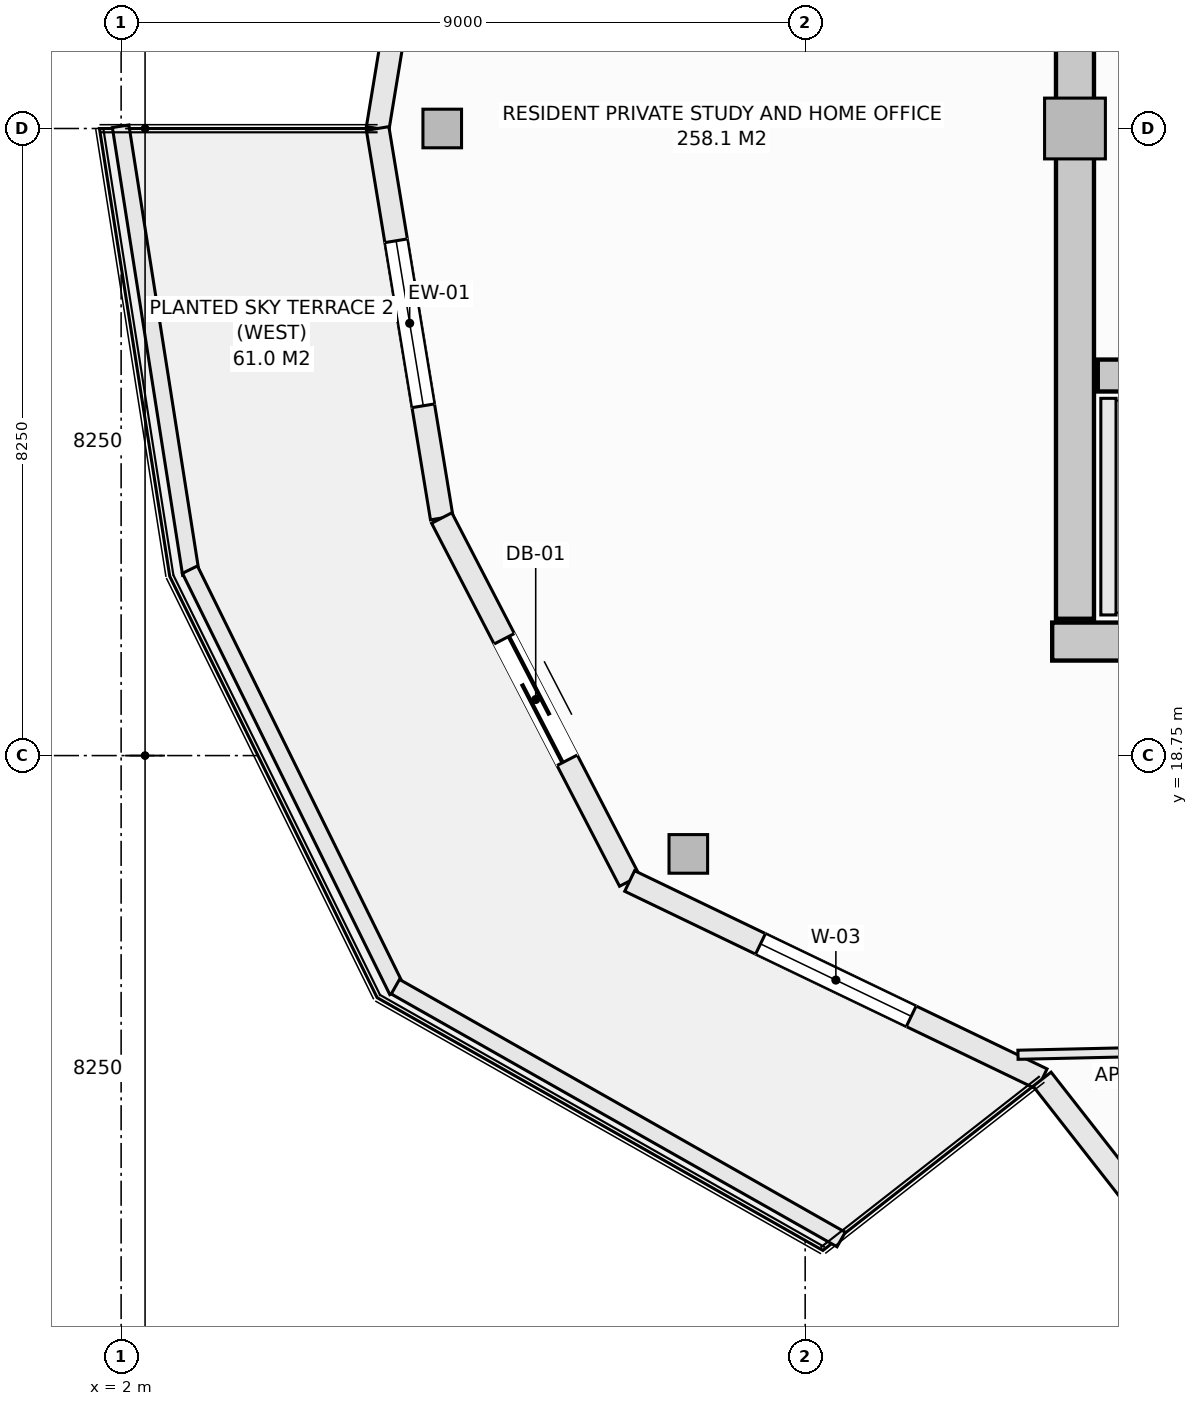
"""IFC4 building model, lengths in metres.
Left out: names, types, materials, properties, quantities, classifications, styles, units other than length and angle.
Written with IfcOpenShell. Run it as: python <this file> out.ifc"""

import sys

from ifc_helpers import new_model, si_unit, direction, frame, frame_2d, origin, origin_2d, place, context, subcontext, project, spatial, rectangle, hollow_rectangle, extrude, element, fill, save


model = new_model("IFC4")
c1 = context("Model", 3, precision=1e-05, world=origin(), true_north=direction((0.0, 1.0)))
c2 = subcontext(c1, "Body", "Model", "MODEL_VIEW")
j1 = project(units=[si_unit("LENGTHUNIT", "METRE"), si_unit("PLANEANGLEUNIT", "RADIAN")], contexts=[c1])
p1 = place(None, origin())
s1 = spatial("IfcSite", under=j1, at=p1, CompositionType="ELEMENT")
p2 = place(p1, origin())
s2 = spatial("IfcBuilding", under=s1, at=p2, CompositionType="ELEMENT")
p3 = place(p2, frame((0.0, 0.0, 229.4)))
s3 = spatial("IfcBuildingStorey", under=s2, at=p3, CompositionType="ELEMENT", Elevation=229.4)
p4 = place(p3, frame((14.25, 20.25, -0.27), z_axis=(0.0, 0.0, 1.0), x_axis=(1.0, 0.0, 0.0)))
e1 = element("IfcWall", 1, at=p4, inside=s3, PredefinedType="SHEAR", context=c2, shape_type="SweptSolid", body=[
    extrude(rectangle(XDim=13.5, YDim=0.5, at=frame_2d((6.75, 0.0))), origin(), (0.0, 0.0, 1.0), 3.3),
])
p5 = place(p3, frame((14.55, 20.55, -0.27), z_axis=(0.0, 0.0, 1.0), x_axis=(0.0, 1.0, 0.0)))
e2 = element("IfcWall", 2, at=p5, inside=s3, PredefinedType="SHEAR", context=c2, shape_type="SweptSolid", body=[
    extrude(rectangle(XDim=12.9, YDim=0.5, at=frame_2d((6.45, 0.0))), origin(), (0.0, 0.0, 1.0), 3.3),
])
p6 = place(p3, frame((14.85, 23.75, -0.27), z_axis=(0.0, 0.0, 1.0), x_axis=(1.0, 0.0, 0.0)))
e3 = element("IfcWall", 3, at=p6, inside=s3, PredefinedType="SHEAR", context=c2, shape_type="SweptSolid", body=[
    extrude(rectangle(XDim=7.3, YDim=0.42, at=frame_2d((3.65, 0.0))), origin(), (0.0, 0.0, 1.0), 3.3),
])
for number, where, z_axis, x_axis in (
    (4, (6.225, 27.0, -0.27), (0.0, 0.0, 1.0), (1.0, 0.0, 0.0)),
    (5, (9.463, 17.456, -0.27), (0.0, 0.0, 1.0), (1.0, 0.0, 0.0)),
):
    element("IfcColumn", number, at=place(p3, frame(where, z_axis=z_axis, x_axis=x_axis)), inside=s3, PredefinedType="COLUMN", context=c2, shape_type="SweptSolid", body=[
        extrude(hollow_rectangle(XDim=0.508, YDim=0.508, WallThickness=0.019, at=origin_2d()), origin(), (0.0, 0.0, 1.0), 3.3),
    ])
p7 = place(p3, frame((14.55, 27.0, -0.27), z_axis=(0.0, 0.0, 1.0), x_axis=(1.0, 0.0, 0.0)))
e6 = element("IfcColumn", 6, at=p7, inside=s3, PredefinedType="PILASTER", context=c2, shape_type="SweptSolid", body=[
    extrude(rectangle(XDim=0.8, YDim=0.8, at=origin_2d()), origin(), (0.0, 0.0, 1.0), 3.3),
])
p8 = place(p3, frame((5.375, 27.0, 0.0), z_axis=(0.0, 0.0, 1.0), x_axis=(0.16237087798, 0.986729799886, 0.0)))
e7 = element("IfcWall", 7, at=p8, inside=s3, PredefinedType="SOLIDWALL", context=c2, shape_type="SweptSolid", body=[
    extrude(rectangle(XDim=5.193, YDim=0.3, at=frame_2d((2.597, 0.0))), origin(), (0.0, 0.0, 1.0), 2.605),
])
p9 = place(p8, frame((1.497, 0.0, 0.72)))
e8 = element("IfcOpeningElement", 8, at=p9, cuts=e7, PredefinedType="OPENING", context=c2, shape_type="SweptSolid", body=[
    extrude(rectangle(XDim=2.2, YDim=1.65, at=frame_2d((1.1, 0.825))), frame((0.0, 0.16, 0.0), z_axis=(0.0, -1.0, 0.0), x_axis=(1.0, 0.0, 0.0)), (0.0, 0.0, 1.0), 0.32),
])
p10 = place(p3, frame((5.375, 27.0, 0.0), z_axis=(0.0, 0.0, 1.0), x_axis=(0.16237087798, -0.986729799886, 0.0)))
e9 = element("IfcWall", 9, at=p10, inside=s3, PredefinedType="SOLIDWALL", context=c2, shape_type="SweptSolid", body=[
    extrude(rectangle(XDim=5.193, YDim=0.3, at=frame_2d((2.597, 0.0))), origin(), (0.0, 0.0, 1.0), 2.605),
])
p11 = place(p10, frame((1.497, 0.0, 0.72)))
e10 = element("IfcOpeningElement", 10, at=p11, cuts=e9, PredefinedType="OPENING", context=c2, shape_type="SweptSolid", body=[
    extrude(rectangle(XDim=2.2, YDim=1.65, at=frame_2d((1.1, 0.825))), frame((0.0, 0.16, 0.0), z_axis=(0.0, -1.0, 0.0), x_axis=(1.0, 0.0, 0.0)), (0.0, 0.0, 1.0), 0.32),
])
p12 = place(p3, frame((6.218, 21.875, 0.0), z_axis=(0.0, 0.0, 1.0), x_axis=(0.459808219482, -0.888018243786, 0.0)))
e11 = element("IfcWall", 11, at=p12, inside=s3, PredefinedType="SOLIDWALL", context=c2, shape_type="SweptSolid", body=[
    extrude(rectangle(XDim=5.378, YDim=0.3, at=frame_2d((2.689, 0.0))), origin(), (0.0, 0.0, 1.0), 2.605),
])
p13 = place(p12, frame((1.789, 0.0, 0.0)))
e12 = element("IfcOpeningElement", 12, at=p13, cuts=e11, PredefinedType="OPENING", context=c2, shape_type="SweptSolid", body=[
    extrude(rectangle(XDim=1.8, YDim=2.25, at=frame_2d((0.9, 1.125))), frame((0.0, 0.16, 0.0), z_axis=(0.0, -1.0, 0.0), x_axis=(1.0, 0.0, 0.0)), (0.0, 0.0, 1.0), 0.32),
])
p14 = place(p3, frame((8.691, 17.1, 0.0), z_axis=(0.0, 0.0, 1.0), x_axis=(0.901348331142, -0.433094892545, 0.0)))
e13 = element("IfcWall", 13, at=p14, inside=s3, PredefinedType="SOLIDWALL", context=c2, shape_type="SweptSolid", body=[
    extrude(rectangle(XDim=6.021, YDim=0.3, at=frame_2d((3.01, 0.0))), origin(), (0.0, 0.0, 1.0), 2.605),
])
p15 = place(p14, frame((1.91, 0.0, 0.72)))
e14 = element("IfcOpeningElement", 14, at=p15, cuts=e13, PredefinedType="OPENING", context=c2, shape_type="SweptSolid", body=[
    extrude(rectangle(XDim=2.2, YDim=1.65, at=frame_2d((1.1, 0.825))), frame((0.0, 0.16, 0.0), z_axis=(0.0, -1.0, 0.0), x_axis=(1.0, 0.0, 0.0)), (0.0, 0.0, 1.0), 0.32),
])
p16 = place(p3, frame((14.117, 14.493, 0.0), z_axis=(0.0, 0.0, 1.0), x_axis=(0.616450126935, -0.787393955401, 0.0)))
e15 = element("IfcWall", 15, at=p16, inside=s3, PredefinedType="SOLIDWALL", context=c2, shape_type="SweptSolid", body=[
    extrude(rectangle(XDim=5.893, YDim=0.3, at=frame_2d((2.946, 0.0))), origin(), (0.0, 0.0, 1.0), 2.605),
])
p17 = place(p16, frame((1.846, 0.0, 0.72)))
e16 = element("IfcOpeningElement", 16, at=p17, cuts=e15, PredefinedType="OPENING", context=c2, shape_type="SweptSolid", body=[
    extrude(rectangle(XDim=2.2, YDim=1.65, at=frame_2d((1.1, 0.825))), frame((0.0, 0.16, 0.0), z_axis=(0.0, -1.0, 0.0), x_axis=(1.0, 0.0, 0.0)), (0.0, 0.0, 1.0), 0.32),
])
p18 = place(p3, frame((1.993, 27.029, 0.0), z_axis=(0.0, 0.0, 1.0), x_axis=(0.1550711793, -0.987903299595, 0.0)))
e17 = element("IfcWall", 17, at=p18, inside=s3, PredefinedType="PARAPET", context=c2, shape_type="SweptSolid", body=[
    extrude(rectangle(XDim=5.964, YDim=0.22, at=frame_2d((2.982, 0.0))), origin(), (0.0, 0.0, 1.0), 0.52),
])
p19 = place(p3, frame((2.906, 21.196, 0.0), z_axis=(0.0, 0.0, 1.0), x_axis=(0.441640961804, -0.897191875162, 0.0)))
e18 = element("IfcWall", 18, at=p19, inside=s3, PredefinedType="PARAPET", context=c2, shape_type="SweptSolid", body=[
    extrude(rectangle(XDim=6.178, YDim=0.22, at=frame_2d((3.089, 0.0))), origin(), (0.0, 0.0, 1.0), 0.52),
])
p20 = place(p3, frame((5.608, 15.709, 0.0), z_axis=(0.0, 0.0, 1.0), x_axis=(0.869860619267, -0.493297580623, 0.0)))
e19 = element("IfcWall", 19, at=p20, inside=s3, PredefinedType="PARAPET", context=c2, shape_type="SweptSolid", body=[
    extrude(rectangle(XDim=6.743, YDim=0.22, at=frame_2d((3.371, 0.0))), origin(), (0.0, 0.0, 1.0), 0.52),
])
p21 = place(p3, frame((14.99, 20.6, 0.0), z_axis=(0.0, 0.0, 1.0), x_axis=(0.0, 1.0, 0.0)))
e20 = element("IfcWall", 20, at=p21, inside=s3, PredefinedType="SOLIDWALL", context=c2, shape_type="SweptSolid", body=[
    extrude(rectangle(XDim=2.85, YDim=0.2, at=frame_2d((1.425, 0.0))), origin(), (0.0, 0.0, 1.0), 3.03),
])
p22 = place(p3, frame((13.8, 14.814, 0.0), z_axis=(0.0, 0.0, 1.0), x_axis=(0.999752677802, 0.022239227231, 0.0)))
e21 = element("IfcWall", 21, at=p22, inside=s3, PredefinedType="PARTITIONING", context=c2, shape_type="SweptSolid", body=[
    extrude(rectangle(XDim=13.261, YDim=0.12, at=frame_2d((6.631, 0.0))), origin(), (0.0, 0.0, 1.0), 2.478),
])
p23 = place(p11, origin())
e22 = element("IfcWindow", 22, at=p23, inside=s3, PartitioningType="SINGLE_PANEL", PredefinedType="WINDOW", context=c2, shape_type="SweptSolid", body=[
    extrude(rectangle(XDim=2.2, YDim=1.65, at=frame_2d((1.1, 0.825))), frame((0.0, 0.03, 0.0), z_axis=(0.0, -1.0, 0.0), x_axis=(1.0, 0.0, 0.0)), (0.0, 0.0, 1.0), 0.06),
])
fill(e10, e22)
p24 = place(p13, frame((1.8, 0.0, 0.0), z_axis=(0.0, 0.0, 1.0), x_axis=(-1.0, 0.0, 0.0)))
e23 = element("IfcDoor", 23, at=p24, inside=s3, OperationType="SLIDING_TO_LEFT", PredefinedType="DOOR", context=c2, shape_type="SweptSolid", body=[
    extrude(rectangle(XDim=1.8, YDim=2.25, at=frame_2d((0.9, 1.125))), frame((0.0, 0.025, 0.0), z_axis=(0.0, -1.0, 0.0), x_axis=(1.0, 0.0, 0.0)), (0.0, 0.0, 1.0), 0.05),
])
fill(e12, e23)
p25 = place(p15, origin())
e24 = element("IfcWindow", 24, at=p25, inside=s3, PartitioningType="SINGLE_PANEL", PredefinedType="WINDOW", context=c2, shape_type="SweptSolid", body=[
    extrude(rectangle(XDim=2.2, YDim=1.65, at=frame_2d((1.1, 0.825))), frame((0.0, 0.03, 0.0), z_axis=(0.0, -1.0, 0.0), x_axis=(1.0, 0.0, 0.0)), (0.0, 0.0, 1.0), 0.06),
])
fill(e14, e24)
save(model, sys.argv[1])
